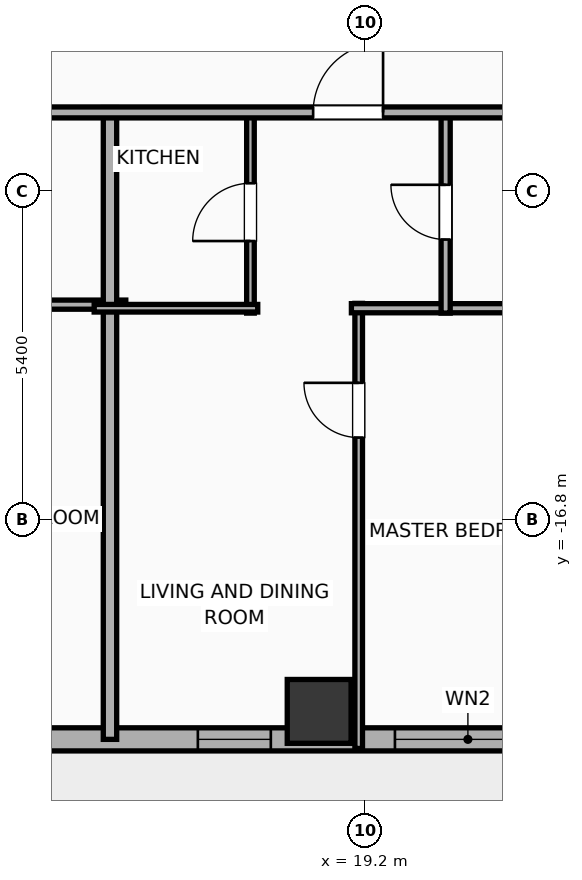
"""IFC4 building model, lengths in metres.
Left out: names, types, materials, properties, quantities, classifications, styles, units other than length and angle.
Written with IfcOpenShell. Run it as: python <this file> out.ifc"""

import sys

from ifc_helpers import new_model, si_unit, direction, frame, frame_2d, origin, origin_2d, place, context, subcontext, project, spatial, rectangle, hollow_rectangle, extrude, element, fill, save


model = new_model("IFC4")
c1 = context("Model", 3, precision=1e-05, world=origin(), true_north=direction((0.0, 1.0)))
c2 = subcontext(c1, "Body", "Model", "MODEL_VIEW")
j1 = project(units=[si_unit("LENGTHUNIT", "METRE"), si_unit("PLANEANGLEUNIT", "RADIAN")], contexts=[c1])
p1 = place(None, origin())
s1 = spatial("IfcSite", under=j1, at=p1, CompositionType="ELEMENT")
p2 = place(p1, origin())
s2 = spatial("IfcBuilding", under=s1, at=p2, CompositionType="ELEMENT")
p3 = place(p2, frame((0.0, 0.0, 113.1)))
s3 = spatial("IfcBuildingStorey", under=s2, at=p3, CompositionType="ELEMENT", Elevation=113.1)
p4 = place(p3, frame((18.44, -19.95, 0.0), z_axis=(0.0, 0.0, 1.0), x_axis=(1.0, 0.0, 0.0)))
e1 = element("IfcColumn", 1, at=p4, inside=s3, PredefinedType="COLUMN", context=c2, shape_type="SweptSolid", body=[
    extrude(hollow_rectangle(XDim=1.05, YDim=1.05, WallThickness=0.036, at=origin_2d()), origin(), (0.0, 0.0, 1.0), 3.9),
])
p5 = place(p3, frame((29.381, -20.41, 0.0), z_axis=(0.0, 0.0, 1.0), x_axis=(-1.0, 0.0, 0.0)))
e2 = element("IfcWall", 2, at=p5, inside=s3, PredefinedType="ELEMENTEDWALL", context=c2, shape_type="SweptSolid", body=[
    extrude(rectangle(XDim=54.763, YDim=0.38, at=frame_2d((27.381, 0.0))), origin(), (0.0, 0.0, 1.0), 3.65),
])
p6 = place(p5, frame((15.679, 0.0, 0.0)))
e3 = element("IfcOpeningElement", 3, at=p6, cuts=e2, PredefinedType="OPENING", context=c2, shape_type="SweptSolid", body=[
    extrude(rectangle(XDim=1.5, YDim=2.05, at=frame_2d((0.75, 1.025))), frame((0.0, 0.2, 0.0), z_axis=(0.0, -1.0, 0.0), x_axis=(1.0, 0.0, 0.0)), (0.0, 0.0, 1.0), 0.4),
])
p7 = place(p5, frame((7.295, 0.0, 0.75)))
e4 = element("IfcOpeningElement", 4, at=p7, cuts=e2, PredefinedType="OPENING", context=c2, shape_type="SweptSolid", body=[
    extrude(rectangle(XDim=2.4, YDim=2.1, at=frame_2d((1.2, 1.05))), frame((0.0, 0.2, 0.0), z_axis=(0.0, -1.0, 0.0), x_axis=(1.0, 0.0, 0.0)), (0.0, 0.0, 1.0), 0.4),
])
p8 = place(p5, frame((18.486, 0.0, 0.75)))
e5 = element("IfcOpeningElement", 5, at=p8, cuts=e2, PredefinedType="OPENING", context=c2, shape_type="SweptSolid", body=[
    extrude(rectangle(XDim=2.4, YDim=2.1, at=frame_2d((1.2, 1.05))), frame((0.0, 0.2, 0.0), z_axis=(0.0, -1.0, 0.0), x_axis=(1.0, 0.0, 0.0)), (0.0, 0.0, 1.0), 0.4),
])
p9 = place(p5, frame((33.877, 0.0, 0.75)))
e6 = element("IfcOpeningElement", 6, at=p9, cuts=e2, PredefinedType="OPENING", context=c2, shape_type="SweptSolid", body=[
    extrude(rectangle(XDim=2.4, YDim=2.1, at=frame_2d((1.2, 1.05))), frame((0.0, 0.2, 0.0), z_axis=(0.0, -1.0, 0.0), x_axis=(1.0, 0.0, 0.0)), (0.0, 0.0, 1.0), 0.4),
])
p10 = place(p5, frame((48.367, 0.0, 0.75)))
e7 = element("IfcOpeningElement", 7, at=p10, cuts=e2, PredefinedType="OPENING", context=c2, shape_type="SweptSolid", body=[
    extrude(rectangle(XDim=2.4, YDim=2.1, at=frame_2d((1.2, 1.05))), frame((0.0, 0.2, 0.0), z_axis=(0.0, -1.0, 0.0), x_axis=(1.0, 0.0, 0.0)), (0.0, 0.0, 1.0), 0.4),
])
p11 = place(p5, frame((37.584, 0.0, 0.0)))
e8 = element("IfcOpeningElement", 8, at=p11, cuts=e2, PredefinedType="OPENING", context=c2, shape_type="SweptSolid", body=[
    extrude(rectangle(XDim=1.5, YDim=2.05, at=frame_2d((0.75, 1.025))), frame((0.0, 0.2, 0.0), z_axis=(0.0, -1.0, 0.0), x_axis=(1.0, 0.0, 0.0)), (0.0, 0.0, 1.0), 0.4),
])
p12 = place(p5, frame((52.277, 0.0, 0.75)))
e9 = element("IfcOpeningElement", 9, at=p12, cuts=e2, PredefinedType="OPENING", context=c2, shape_type="SweptSolid", body=[
    extrude(rectangle(XDim=1.2, YDim=2.05, at=frame_2d((0.6, 1.025))), frame((0.0, 0.2, 0.0), z_axis=(0.0, -1.0, 0.0), x_axis=(1.0, 0.0, 0.0)), (0.0, 0.0, 1.0), 0.4),
])
p13 = place(p5, frame((45.486, 0.0, 0.75)))
e10 = element("IfcOpeningElement", 10, at=p13, cuts=e2, PredefinedType="OPENING", context=c2, shape_type="SweptSolid", body=[
    extrude(rectangle(XDim=1.2, YDim=2.05, at=frame_2d((0.6, 1.025))), frame((0.0, 0.2, 0.0), z_axis=(0.0, -1.0, 0.0), x_axis=(1.0, 0.0, 0.0)), (0.0, 0.0, 1.0), 0.4),
])
p14 = place(p5, frame((41.736, 0.0, 0.75)))
e11 = element("IfcOpeningElement", 11, at=p14, cuts=e2, PredefinedType="OPENING", context=c2, shape_type="SweptSolid", body=[
    extrude(rectangle(XDim=1.2, YDim=2.05, at=frame_2d((0.6, 1.025))), frame((0.0, 0.2, 0.0), z_axis=(0.0, -1.0, 0.0), x_axis=(1.0, 0.0, 0.0)), (0.0, 0.0, 1.0), 0.4),
])
p15 = place(p5, frame((30.486, 0.0, 0.75)))
e12 = element("IfcOpeningElement", 12, at=p15, cuts=e2, PredefinedType="OPENING", context=c2, shape_type="SweptSolid", body=[
    extrude(rectangle(XDim=1.2, YDim=2.05, at=frame_2d((0.6, 1.025))), frame((0.0, 0.2, 0.0), z_axis=(0.0, -1.0, 0.0), x_axis=(1.0, 0.0, 0.0)), (0.0, 0.0, 1.0), 0.4),
])
p16 = place(p5, frame((26.736, 0.0, 0.75)))
e13 = element("IfcOpeningElement", 13, at=p16, cuts=e2, PredefinedType="OPENING", context=c2, shape_type="SweptSolid", body=[
    extrude(rectangle(XDim=1.2, YDim=2.05, at=frame_2d((0.6, 1.025))), frame((0.0, 0.2, 0.0), z_axis=(0.0, -1.0, 0.0), x_axis=(1.0, 0.0, 0.0)), (0.0, 0.0, 1.0), 0.4),
])
p17 = place(p5, frame((22.986, 0.0, 0.75)))
e14 = element("IfcOpeningElement", 14, at=p17, cuts=e2, PredefinedType="OPENING", context=c2, shape_type="SweptSolid", body=[
    extrude(rectangle(XDim=1.2, YDim=2.05, at=frame_2d((0.6, 1.025))), frame((0.0, 0.2, 0.0), z_axis=(0.0, -1.0, 0.0), x_axis=(1.0, 0.0, 0.0)), (0.0, 0.0, 1.0), 0.4),
])
p18 = place(p5, frame((11.736, 0.0, 0.75)))
e15 = element("IfcOpeningElement", 15, at=p18, cuts=e2, PredefinedType="OPENING", context=c2, shape_type="SweptSolid", body=[
    extrude(rectangle(XDim=1.2, YDim=2.05, at=frame_2d((0.6, 1.025))), frame((0.0, 0.2, 0.0), z_axis=(0.0, -1.0, 0.0), x_axis=(1.0, 0.0, 0.0)), (0.0, 0.0, 1.0), 0.4),
])
p19 = place(p5, frame((3.286, 0.0, 0.75)))
e16 = element("IfcOpeningElement", 16, at=p19, cuts=e2, PredefinedType="OPENING", context=c2, shape_type="SweptSolid", body=[
    extrude(rectangle(XDim=1.2, YDim=2.05, at=frame_2d((0.6, 1.025))), frame((0.0, 0.2, 0.0), z_axis=(0.0, -1.0, 0.0), x_axis=(1.0, 0.0, 0.0)), (0.0, 0.0, 1.0), 0.4),
])
p20 = place(p3, frame((11.47, -13.261, 0.0), z_axis=(0.0, 0.0, 1.0), x_axis=(1.0, 0.0, 0.0)))
e17 = element("IfcWall", 17, at=p20, inside=s3, PredefinedType="PLUMBINGWALL", context=c2, shape_type="SweptSolid", body=[
    extrude(rectangle(XDim=3.79, YDim=0.15, at=frame_2d((1.895, 0.0))), origin(), (0.0, 0.0, 1.0), 3.65),
])
p21 = place(p3, frame((15.0, -20.41, 0.0), z_axis=(0.0, 0.0, 1.0), x_axis=(0.0, 1.0, 0.0)))
e18 = element("IfcWall", 18, at=p21, inside=s3, PredefinedType="PARTITIONING", context=c2, shape_type="SweptSolid", body=[
    extrude(rectangle(XDim=10.39, YDim=0.22, at=frame_2d((5.195, 0.0))), origin(), (0.0, 0.0, 1.0), 3.65),
])
p22 = place(p3, frame((19.09, -20.56, 0.0), z_axis=(0.0, 0.0, 1.0), x_axis=(0.0, 1.0, 0.0)))
e19 = element("IfcWall", 19, at=p22, inside=s3, PredefinedType="PARTITIONING", context=c2, shape_type="SweptSolid", body=[
    extrude(rectangle(XDim=7.32, YDim=0.125, at=frame_2d((3.66, 0.0))), origin(), (0.0, 0.0, 1.0), 3.65),
])
p23 = place(p22, frame((5.113, 0.0, 0.0)))
e20 = element("IfcOpeningElement", 20, at=p23, cuts=e19, PredefinedType="OPENING", context=c2, shape_type="SweptSolid", body=[
    extrude(rectangle(XDim=0.9, YDim=2.05, at=frame_2d((0.45, 1.025))), frame((0.0, 0.073, 0.0), z_axis=(0.0, -1.0, 0.0), x_axis=(1.0, 0.0, 0.0)), (0.0, 0.0, 1.0), 0.145),
])
p24 = place(p3, frame((18.97, -13.32, 0.0), z_axis=(0.0, 0.0, 1.0), x_axis=(1.0, 0.0, 0.0)))
e21 = element("IfcWall", 21, at=p24, inside=s3, PredefinedType="PLUMBINGWALL", context=c2, shape_type="SweptSolid", body=[
    extrude(rectangle(XDim=3.605, YDim=0.15, at=frame_2d((1.802, 0.0))), origin(), (0.0, 0.0, 1.0), 3.65),
])
p25 = place(p3, frame((17.31, -13.4, 0.0), z_axis=(0.0, 0.0, 1.0), x_axis=(0.0, 1.0, 0.0)))
e22 = element("IfcWall", 22, at=p25, inside=s3, PredefinedType="PARTITIONING", context=c2, shape_type="SweptSolid", body=[
    extrude(rectangle(XDim=3.32, YDim=0.125, at=frame_2d((1.66, 0.0))), origin(), (0.0, 0.0, 1.0), 3.65),
])
p26 = place(p25, frame((1.185, 0.0, 0.0)))
e23 = element("IfcOpeningElement", 23, at=p26, cuts=e22, PredefinedType="OPENING", context=c2, shape_type="SweptSolid", body=[
    extrude(rectangle(XDim=0.95, YDim=2.05, at=frame_2d((0.475, 1.025))), frame((0.0, 0.073, 0.0), z_axis=(0.0, -1.0, 0.0), x_axis=(1.0, 0.0, 0.0)), (0.0, 0.0, 1.0), 0.145),
])
p27 = place(p3, frame((14.74, -13.32, 0.0), z_axis=(0.0, 0.0, 1.0), x_axis=(1.0, 0.0, 0.0)))
e24 = element("IfcWall", 24, at=p27, inside=s3, PredefinedType="PARTITIONING", context=c2, shape_type="SweptSolid", body=[
    extrude(rectangle(XDim=2.69, YDim=0.125, at=frame_2d((1.345, 0.0))), origin(), (0.0, 0.0, 1.0), 3.65),
])
p28 = place(p3, frame((20.52, -13.4, 0.0), z_axis=(0.0, 0.0, 1.0), x_axis=(0.0, 1.0, 0.0)))
e25 = element("IfcWall", 25, at=p28, inside=s3, PredefinedType="PLUMBINGWALL", context=c2, shape_type="SweptSolid", body=[
    extrude(rectangle(XDim=3.32, YDim=0.15, at=frame_2d((1.66, 0.0))), origin(), (0.0, 0.0, 1.0), 3.65),
])
p29 = place(p28, frame((1.21, 0.0, 0.0)))
e26 = element("IfcOpeningElement", 26, at=p29, cuts=e25, PredefinedType="OPENING", context=c2, shape_type="SweptSolid", body=[
    extrude(rectangle(XDim=0.9, YDim=2.05, at=frame_2d((0.45, 1.025))), frame((0.0, 0.085, 0.0), z_axis=(0.0, -1.0, 0.0), x_axis=(1.0, 0.0, 0.0)), (0.0, 0.0, 1.0), 0.17),
])
p30 = place(p3, frame((-29.21, -10.1, 0.0), z_axis=(0.0, 0.0, 1.0), x_axis=(1.0, 0.0, 0.0)))
e27 = element("IfcWall", 27, at=p30, inside=s3, PredefinedType="PARTITIONING", context=c2, shape_type="SweptSolid", body=[
    extrude(rectangle(XDim=62.42, YDim=0.18, at=frame_2d((31.21, 0.0))), origin(), (0.0, 0.0, 1.0), 3.65),
])
p31 = place(p30, frame((3.002, 0.0, 0.0)))
e28 = element("IfcOpeningElement", 28, at=p31, cuts=e27, PredefinedType="OPENING", context=c2, shape_type="SweptSolid", body=[
    extrude(rectangle(XDim=0.9, YDim=2.05, at=frame_2d((0.45, 1.025))), frame((0.0, 0.1, 0.0), z_axis=(0.0, -1.0, 0.0), x_axis=(1.0, 0.0, 0.0)), (0.0, 0.0, 1.0), 0.2),
])
p32 = place(p30, frame((10.049, 0.0, 0.0)))
e29 = element("IfcOpeningElement", 29, at=p32, cuts=e27, PredefinedType="OPENING", context=c2, shape_type="SweptSolid", body=[
    extrude(rectangle(XDim=1.15, YDim=2.05, at=frame_2d((0.575, 1.025))), frame((0.0, 0.1, 0.0), z_axis=(0.0, -1.0, 0.0), x_axis=(1.0, 0.0, 0.0)), (0.0, 0.0, 1.0), 0.2),
])
p33 = place(p30, frame((17.552, 0.0, 0.0)))
e30 = element("IfcOpeningElement", 30, at=p33, cuts=e27, PredefinedType="OPENING", context=c2, shape_type="SweptSolid", body=[
    extrude(rectangle(XDim=1.15, YDim=2.05, at=frame_2d((0.575, 1.025))), frame((0.0, 0.1, 0.0), z_axis=(0.0, -1.0, 0.0), x_axis=(1.0, 0.0, 0.0)), (0.0, 0.0, 1.0), 0.2),
])
p34 = place(p30, frame((25.048, 0.0, 0.0)))
e31 = element("IfcOpeningElement", 31, at=p34, cuts=e27, PredefinedType="OPENING", context=c2, shape_type="SweptSolid", body=[
    extrude(rectangle(XDim=1.15, YDim=2.05, at=frame_2d((0.575, 1.025))), frame((0.0, 0.1, 0.0), z_axis=(0.0, -1.0, 0.0), x_axis=(1.0, 0.0, 0.0)), (0.0, 0.0, 1.0), 0.2),
])
p35 = place(p30, frame((32.551, 0.0, 0.0)))
e32 = element("IfcOpeningElement", 32, at=p35, cuts=e27, PredefinedType="OPENING", context=c2, shape_type="SweptSolid", body=[
    extrude(rectangle(XDim=1.15, YDim=2.05, at=frame_2d((0.575, 1.025))), frame((0.0, 0.1, 0.0), z_axis=(0.0, -1.0, 0.0), x_axis=(1.0, 0.0, 0.0)), (0.0, 0.0, 1.0), 0.2),
])
p36 = place(p30, frame((40.048, 0.0, 0.0)))
e33 = element("IfcOpeningElement", 33, at=p36, cuts=e27, PredefinedType="OPENING", context=c2, shape_type="SweptSolid", body=[
    extrude(rectangle(XDim=1.15, YDim=2.05, at=frame_2d((0.575, 1.025))), frame((0.0, 0.1, 0.0), z_axis=(0.0, -1.0, 0.0), x_axis=(1.0, 0.0, 0.0)), (0.0, 0.0, 1.0), 0.2),
])
p37 = place(p30, frame((47.551, 0.0, 0.0)))
e34 = element("IfcOpeningElement", 34, at=p37, cuts=e27, PredefinedType="OPENING", context=c2, shape_type="SweptSolid", body=[
    extrude(rectangle(XDim=1.15, YDim=2.05, at=frame_2d((0.575, 1.025))), frame((0.0, 0.1, 0.0), z_axis=(0.0, -1.0, 0.0), x_axis=(1.0, 0.0, 0.0)), (0.0, 0.0, 1.0), 0.2),
])
p38 = place(p30, frame((57.064, 0.0, 0.0)))
e35 = element("IfcOpeningElement", 35, at=p38, cuts=e27, PredefinedType="OPENING", context=c2, shape_type="SweptSolid", body=[
    extrude(rectangle(XDim=1.15, YDim=2.05, at=frame_2d((0.575, 1.025))), frame((0.0, 0.1, 0.0), z_axis=(0.0, -1.0, 0.0), x_axis=(1.0, 0.0, 0.0)), (0.0, 0.0, 1.0), 0.2),
])
p39 = place(p7, origin())
e36 = element("IfcWindow", 36, at=p39, inside=s3, PartitioningType="SINGLE_PANEL", PredefinedType="WINDOW", context=c2, shape_type="SweptSolid", body=[
    extrude(rectangle(XDim=2.4, YDim=2.1, at=frame_2d((1.2, 1.05))), frame((0.0, 0.03, 0.0), z_axis=(0.0, -1.0, 0.0), x_axis=(1.0, 0.0, 0.0)), (0.0, 0.0, 1.0), 0.06),
])
fill(e4, e36)
p40 = place(p18, origin())
e37 = element("IfcWindow", 37, at=p40, inside=s3, PartitioningType="SINGLE_PANEL", PredefinedType="WINDOW", context=c2, shape_type="SweptSolid", body=[
    extrude(rectangle(XDim=1.2, YDim=2.05, at=frame_2d((0.6, 1.025))), frame((0.0, 0.03, 0.0), z_axis=(0.0, -1.0, 0.0), x_axis=(1.0, 0.0, 0.0)), (0.0, 0.0, 1.0), 0.06),
])
fill(e15, e37)
p41 = place(p23, origin())
e38 = element("IfcDoor", 38, at=p41, inside=s3, OperationType="SINGLE_SWING_RIGHT", PredefinedType="DOOR", context=c2, shape_type="SweptSolid", body=[
    extrude(rectangle(XDim=0.9, YDim=2.05, at=frame_2d((0.45, 1.025))), frame((0.0, 0.025, 0.0), z_axis=(0.0, -1.0, 0.0), x_axis=(1.0, 0.0, 0.0)), (0.0, 0.0, 1.0), 0.05),
])
fill(e20, e38)
p42 = place(p26, origin())
e39 = element("IfcDoor", 39, at=p42, inside=s3, OperationType="SINGLE_SWING_LEFT", PredefinedType="DOOR", context=c2, shape_type="SweptSolid", body=[
    extrude(rectangle(XDim=0.95, YDim=2.05, at=frame_2d((0.475, 1.025))), frame((0.0, 0.025, 0.0), z_axis=(0.0, -1.0, 0.0), x_axis=(1.0, 0.0, 0.0)), (0.0, 0.0, 1.0), 0.05),
])
fill(e23, e39)
p43 = place(p29, origin())
e40 = element("IfcDoor", 40, at=p43, inside=s3, OperationType="SINGLE_SWING_RIGHT", PredefinedType="DOOR", context=c2, shape_type="SweptSolid", body=[
    extrude(rectangle(XDim=0.9, YDim=2.05, at=frame_2d((0.45, 1.025))), frame((0.0, 0.025, 0.0), z_axis=(0.0, -1.0, 0.0), x_axis=(1.0, 0.0, 0.0)), (0.0, 0.0, 1.0), 0.05),
])
fill(e26, e40)
p44 = place(p37, origin())
e41 = element("IfcDoor", 41, at=p44, inside=s3, OperationType="SINGLE_SWING_RIGHT", PredefinedType="DOOR", context=c2, shape_type="SweptSolid", body=[
    extrude(rectangle(XDim=1.15, YDim=2.05, at=frame_2d((0.575, 1.025))), frame((0.0, 0.025, 0.0), z_axis=(0.0, -1.0, 0.0), x_axis=(1.0, 0.0, 0.0)), (0.0, 0.0, 1.0), 0.05),
])
fill(e34, e41)
save(model, sys.argv[1])
